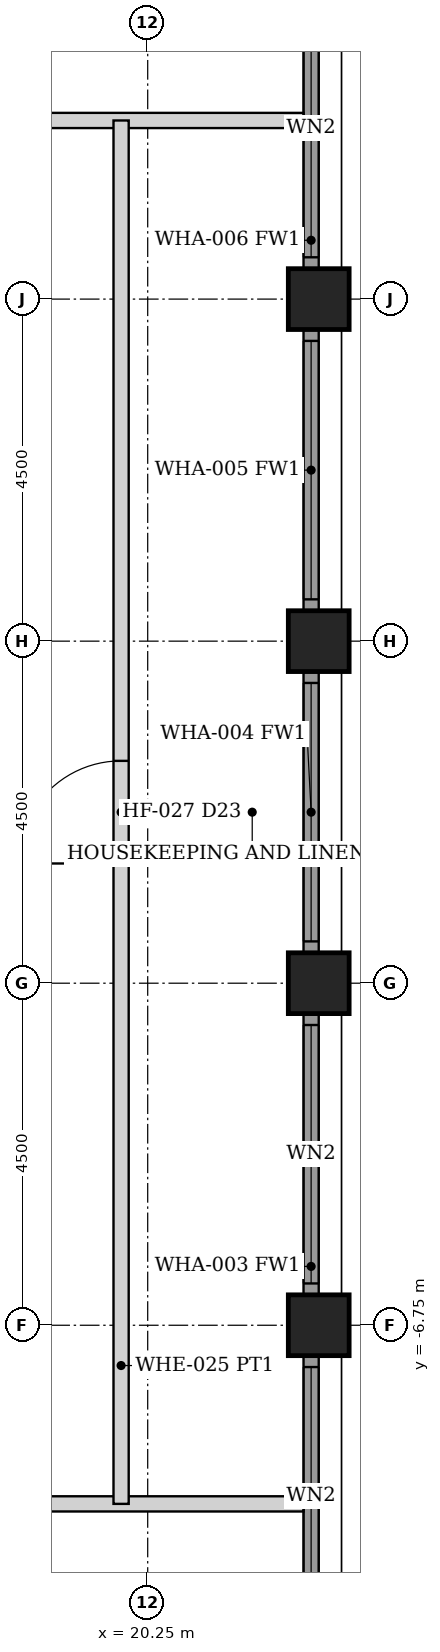
"""IFC4 building model, lengths in metres.
Left out: names, types, materials, properties, quantities, classifications, styles, units other than length and angle.
Written with IfcOpenShell. Run it as: python <this file> out.ifc"""

import sys

from ifc_helpers import new_model, si_unit, direction, frame, frame_2d, origin, origin_2d, place, context, subcontext, project, spatial, rectangle, hollow_rectangle, extrude, element, fill, save


model = new_model("IFC4")
c1 = context("Model", 3, precision=1e-05, world=origin(), true_north=direction((0.0, 1.0)))
c2 = subcontext(c1, "Body", "Model", "MODEL_VIEW")
j1 = project(units=[si_unit("LENGTHUNIT", "METRE"), si_unit("PLANEANGLEUNIT", "RADIAN")], contexts=[c1])
p1 = place(None, origin())
s1 = spatial("IfcSite", under=j1, at=p1, CompositionType="ELEMENT")
p2 = place(p1, origin())
s2 = spatial("IfcBuilding", under=s1, at=p2, CompositionType="ELEMENT")
p3 = place(p2, frame((0.0, 0.0, 172.4)))
s3 = spatial("IfcBuildingStorey", under=s2, at=p3, CompositionType="ELEMENT", Elevation=172.4)
for number, where, z_axis, x_axis in (
    (1, (22.5, -6.75, 0.0), (0.0, 0.0, 1.0), (1.0, 0.0, 0.0)),
    (2, (22.5, -2.25, 0.0), (0.0, 0.0, 1.0), (1.0, 0.0, 0.0)),
    (3, (22.5, 2.25, 0.0), (0.0, 0.0, 1.0), (1.0, 0.0, 0.0)),
    (4, (22.5, 6.75, 0.0), (0.0, 0.0, 1.0), (1.0, 0.0, 0.0)),
):
    element("IfcColumn", number, at=place(p3, frame(where, z_axis=z_axis, x_axis=x_axis)), inside=s3, PredefinedType="COLUMN", context=c2, shape_type="SweptSolid", body=[
        extrude(hollow_rectangle(XDim=0.8, YDim=0.8, WallThickness=0.045, at=origin_2d()), origin(), (0.0, 0.0, 1.0), 3.6),
    ])
p4 = place(p3, frame((22.4, -10.845, 0.0), z_axis=(0.0, 0.0, 1.0), x_axis=(0.0, 1.0, 0.0)))
e5 = element("IfcWall", 5, at=p4, inside=s3, PredefinedType="SOLIDWALL", context=c2, shape_type="SweptSolid", body=[
    extrude(rectangle(XDim=3.69, YDim=0.2, at=frame_2d((1.845, 0.0))), origin(), (0.0, 0.0, 1.0), 2.479),
])
p5 = place(p4, frame((0.145, 0.0, 0.3)))
e6 = element("IfcOpeningElement", 6, at=p5, cuts=e5, PredefinedType="OPENING", context=c2, shape_type="SweptSolid", body=[
    extrude(rectangle(XDim=3.4, YDim=2.029, at=frame_2d((1.7, 1.015))), frame((0.0, 0.11, 0.0), z_axis=(0.0, -1.0, 0.0), x_axis=(1.0, 0.0, 0.0)), (0.0, 0.0, 1.0), 0.22),
])
p6 = place(p3, frame((22.4, -6.345, 0.0), z_axis=(0.0, 0.0, 1.0), x_axis=(0.0, 1.0, 0.0)))
e7 = element("IfcWall", 7, at=p6, inside=s3, PredefinedType="SOLIDWALL", context=c2, shape_type="SweptSolid", body=[
    extrude(rectangle(XDim=3.69, YDim=0.2, at=frame_2d((1.845, 0.0))), origin(), (0.0, 0.0, 1.0), 2.479),
])
p7 = place(p6, frame((0.145, 0.0, 0.3)))
e8 = element("IfcOpeningElement", 8, at=p7, cuts=e7, PredefinedType="OPENING", context=c2, shape_type="SweptSolid", body=[
    extrude(rectangle(XDim=3.4, YDim=2.029, at=frame_2d((1.7, 1.015))), frame((0.0, 0.11, 0.0), z_axis=(0.0, -1.0, 0.0), x_axis=(1.0, 0.0, 0.0)), (0.0, 0.0, 1.0), 0.22),
])
p8 = place(p3, frame((22.4, -1.845, 0.0), z_axis=(0.0, 0.0, 1.0), x_axis=(0.0, 1.0, 0.0)))
e9 = element("IfcWall", 9, at=p8, inside=s3, PredefinedType="SOLIDWALL", context=c2, shape_type="SweptSolid", body=[
    extrude(rectangle(XDim=3.69, YDim=0.2, at=frame_2d((1.845, 0.0))), origin(), (0.0, 0.0, 1.0), 2.479),
])
p9 = place(p8, frame((0.145, 0.0, 0.3)))
e10 = element("IfcOpeningElement", 10, at=p9, cuts=e9, PredefinedType="OPENING", context=c2, shape_type="SweptSolid", body=[
    extrude(rectangle(XDim=3.4, YDim=2.029, at=frame_2d((1.7, 1.015))), frame((0.0, 0.11, 0.0), z_axis=(0.0, -1.0, 0.0), x_axis=(1.0, 0.0, 0.0)), (0.0, 0.0, 1.0), 0.22),
])
p10 = place(p3, frame((22.4, 2.655, 0.0), z_axis=(0.0, 0.0, 1.0), x_axis=(0.0, 1.0, 0.0)))
e11 = element("IfcWall", 11, at=p10, inside=s3, PredefinedType="SOLIDWALL", context=c2, shape_type="SweptSolid", body=[
    extrude(rectangle(XDim=3.69, YDim=0.2, at=frame_2d((1.845, 0.0))), origin(), (0.0, 0.0, 1.0), 2.479),
])
p11 = place(p10, frame((0.145, 0.0, 0.3)))
e12 = element("IfcOpeningElement", 12, at=p11, cuts=e11, PredefinedType="OPENING", context=c2, shape_type="SweptSolid", body=[
    extrude(rectangle(XDim=3.4, YDim=2.029, at=frame_2d((1.7, 1.015))), frame((0.0, 0.11, 0.0), z_axis=(0.0, -1.0, 0.0), x_axis=(1.0, 0.0, 0.0)), (0.0, 0.0, 1.0), 0.22),
])
p12 = place(p3, frame((22.4, 7.155, 0.0), z_axis=(0.0, 0.0, 1.0), x_axis=(0.0, 1.0, 0.0)))
e13 = element("IfcWall", 13, at=p12, inside=s3, PredefinedType="SOLIDWALL", context=c2, shape_type="SweptSolid", body=[
    extrude(rectangle(XDim=3.69, YDim=0.2, at=frame_2d((1.845, 0.0))), origin(), (0.0, 0.0, 1.0), 2.479),
])
p13 = place(p12, frame((0.145, 0.0, 0.3)))
e14 = element("IfcOpeningElement", 14, at=p13, cuts=e13, PredefinedType="OPENING", context=c2, shape_type="SweptSolid", body=[
    extrude(rectangle(XDim=3.4, YDim=2.029, at=frame_2d((1.7, 1.015))), frame((0.0, 0.11, 0.0), z_axis=(0.0, -1.0, 0.0), x_axis=(1.0, 0.0, 0.0)), (0.0, 0.0, 1.0), 0.22),
])
p14 = place(p3, frame((-22.3, 9.1, 0.0), z_axis=(0.0, 0.0, 1.0), x_axis=(1.0, 0.0, 0.0)))
e15 = element("IfcWall", 15, at=p14, inside=s3, PredefinedType="PARTITIONING", context=c2, shape_type="SweptSolid", body=[
    extrude(rectangle(XDim=44.6, YDim=0.2, at=frame_2d((22.3, 0.0))), origin(), (0.0, 0.0, 1.0), 2.473),
])
p15 = place(p14, frame((11.35, 0.0, 0.0)))
e16 = element("IfcOpeningElement", 16, at=p15, cuts=e15, PredefinedType="OPENING", context=c2, shape_type="SweptSolid", body=[
    extrude(rectangle(XDim=0.9, YDim=2.1, at=frame_2d((0.45, 1.05))), frame((0.0, 0.11, 0.0), z_axis=(0.0, -1.0, 0.0), x_axis=(1.0, 0.0, 0.0)), (0.0, 0.0, 1.0), 0.22),
])
p16 = place(p14, frame((18.95, 0.0, 0.0)))
e17 = element("IfcOpeningElement", 17, at=p16, cuts=e15, PredefinedType="OPENING", context=c2, shape_type="SweptSolid", body=[
    extrude(rectangle(XDim=0.9, YDim=2.1, at=frame_2d((0.45, 1.05))), frame((0.0, 0.11, 0.0), z_axis=(0.0, -1.0, 0.0), x_axis=(1.0, 0.0, 0.0)), (0.0, 0.0, 1.0), 0.22),
])
p17 = place(p14, frame((20.25, 0.0, 0.0)))
e18 = element("IfcOpeningElement", 18, at=p17, cuts=e15, PredefinedType="OPENING", context=c2, shape_type="SweptSolid", body=[
    extrude(rectangle(XDim=0.9, YDim=2.1, at=frame_2d((0.45, 1.05))), frame((0.0, 0.11, 0.0), z_axis=(0.0, -1.0, 0.0), x_axis=(1.0, 0.0, 0.0)), (0.0, 0.0, 1.0), 0.22),
])
p18 = place(p14, frame((32.45, 0.0, 0.0)))
e19 = element("IfcOpeningElement", 19, at=p18, cuts=e15, PredefinedType="OPENING", context=c2, shape_type="SweptSolid", body=[
    extrude(rectangle(XDim=0.9, YDim=2.1, at=frame_2d((0.45, 1.05))), frame((0.0, 0.11, 0.0), z_axis=(0.0, -1.0, 0.0), x_axis=(1.0, 0.0, 0.0)), (0.0, 0.0, 1.0), 0.22),
])
p19 = place(p14, frame((36.95, 0.0, 0.0)))
e20 = element("IfcOpeningElement", 20, at=p19, cuts=e15, PredefinedType="OPENING", context=c2, shape_type="SweptSolid", body=[
    extrude(rectangle(XDim=0.9, YDim=2.1, at=frame_2d((0.45, 1.05))), frame((0.0, 0.11, 0.0), z_axis=(0.0, -1.0, 0.0), x_axis=(1.0, 0.0, 0.0)), (0.0, 0.0, 1.0), 0.22),
])
p20 = place(p14, frame((38.85, 0.0, 0.0)))
e21 = element("IfcOpeningElement", 21, at=p20, cuts=e15, PredefinedType="OPENING", context=c2, shape_type="SweptSolid", body=[
    extrude(rectangle(XDim=0.9, YDim=2.1, at=frame_2d((0.45, 1.05))), frame((0.0, 0.11, 0.0), z_axis=(0.0, -1.0, 0.0), x_axis=(1.0, 0.0, 0.0)), (0.0, 0.0, 1.0), 0.22),
])
p21 = place(p14, frame((4.85, 0.0, 0.0)))
e22 = element("IfcOpeningElement", 22, at=p21, cuts=e15, PredefinedType="OPENING", context=c2, shape_type="SweptSolid", body=[
    extrude(rectangle(XDim=0.9, YDim=2.1, at=frame_2d((0.45, 1.05))), frame((0.0, 0.11, 0.0), z_axis=(0.0, -1.0, 0.0), x_axis=(1.0, 0.0, 0.0)), (0.0, 0.0, 1.0), 0.22),
])
p22 = place(p3, frame((-22.3, -9.1, 0.0), z_axis=(0.0, 0.0, 1.0), x_axis=(1.0, 0.0, 0.0)))
e23 = element("IfcWall", 23, at=p22, inside=s3, PredefinedType="PARTITIONING", context=c2, shape_type="SweptSolid", body=[
    extrude(rectangle(XDim=44.6, YDim=0.2, at=frame_2d((22.3, 0.0))), origin(), (0.0, 0.0, 1.0), 2.473),
])
p23 = place(p22, frame((6.75, 0.0, 0.0)))
e24 = element("IfcOpeningElement", 24, at=p23, cuts=e23, PredefinedType="OPENING", context=c2, shape_type="SweptSolid", body=[
    extrude(rectangle(XDim=0.9, YDim=2.1, at=frame_2d((0.45, 1.05))), frame((0.0, 0.11, 0.0), z_axis=(0.0, -1.0, 0.0), x_axis=(1.0, 0.0, 0.0)), (0.0, 0.0, 1.0), 0.22),
])
p24 = place(p22, frame((15.75, 0.0, 0.0)))
e25 = element("IfcOpeningElement", 25, at=p24, cuts=e23, PredefinedType="OPENING", context=c2, shape_type="SweptSolid", body=[
    extrude(rectangle(XDim=0.9, YDim=2.1, at=frame_2d((0.45, 1.05))), frame((0.0, 0.11, 0.0), z_axis=(0.0, -1.0, 0.0), x_axis=(1.0, 0.0, 0.0)), (0.0, 0.0, 1.0), 0.22),
])
p25 = place(p22, frame((32.45, 0.0, 0.0)))
e26 = element("IfcOpeningElement", 26, at=p25, cuts=e23, PredefinedType="OPENING", context=c2, shape_type="SweptSolid", body=[
    extrude(rectangle(XDim=0.9, YDim=2.1, at=frame_2d((0.45, 1.05))), frame((0.0, 0.11, 0.0), z_axis=(0.0, -1.0, 0.0), x_axis=(1.0, 0.0, 0.0)), (0.0, 0.0, 1.0), 0.22),
])
p26 = place(p22, frame((33.75, 0.0, 0.0)))
e27 = element("IfcOpeningElement", 27, at=p26, cuts=e23, PredefinedType="OPENING", context=c2, shape_type="SweptSolid", body=[
    extrude(rectangle(XDim=0.9, YDim=2.1, at=frame_2d((0.45, 1.05))), frame((0.0, 0.11, 0.0), z_axis=(0.0, -1.0, 0.0), x_axis=(1.0, 0.0, 0.0)), (0.0, 0.0, 1.0), 0.22),
])
p27 = place(p22, frame((38.85, 0.0, 0.0)))
e28 = element("IfcOpeningElement", 28, at=p27, cuts=e23, PredefinedType="OPENING", context=c2, shape_type="SweptSolid", body=[
    extrude(rectangle(XDim=0.9, YDim=2.1, at=frame_2d((0.45, 1.05))), frame((0.0, 0.11, 0.0), z_axis=(0.0, -1.0, 0.0), x_axis=(1.0, 0.0, 0.0)), (0.0, 0.0, 1.0), 0.22),
])
p28 = place(p22, frame((4.85, 0.0, 0.0)))
e29 = element("IfcOpeningElement", 29, at=p28, cuts=e23, PredefinedType="OPENING", context=c2, shape_type="SweptSolid", body=[
    extrude(rectangle(XDim=0.9, YDim=2.1, at=frame_2d((0.45, 1.05))), frame((0.0, 0.11, 0.0), z_axis=(0.0, -1.0, 0.0), x_axis=(1.0, 0.0, 0.0)), (0.0, 0.0, 1.0), 0.22),
])
p29 = place(p3, frame((19.9, -9.1, 0.0), z_axis=(0.0, 0.0, 1.0), x_axis=(0.0, 1.0, 0.0)))
e30 = element("IfcWall", 30, at=p29, inside=s3, PredefinedType="PARTITIONING", context=c2, shape_type="SweptSolid", body=[
    extrude(rectangle(XDim=18.2, YDim=0.2, at=frame_2d((9.1, 0.0))), origin(), (0.0, 0.0, 1.0), 2.473),
])
p30 = place(p29, frame((8.425, 0.0, 0.0)))
e31 = element("IfcOpeningElement", 31, at=p30, cuts=e30, PredefinedType="OPENING", context=c2, shape_type="SweptSolid", body=[
    extrude(rectangle(XDim=1.35, YDim=2.1, at=frame_2d((0.675, 1.05))), frame((0.0, 0.11, 0.0), z_axis=(0.0, -1.0, 0.0), x_axis=(1.0, 0.0, 0.0)), (0.0, 0.0, 1.0), 0.22),
])
p31 = place(p5, origin())
e32 = element("IfcWindow", 32, at=p31, inside=s3, PartitioningType="SINGLE_PANEL", PredefinedType="WINDOW", context=c2, shape_type="SweptSolid", body=[
    extrude(rectangle(XDim=3.4, YDim=2.029, at=frame_2d((1.7, 1.015))), frame((0.0, 0.03, 0.0), z_axis=(0.0, -1.0, 0.0), x_axis=(1.0, 0.0, 0.0)), (0.0, 0.0, 1.0), 0.06),
])
fill(e6, e32)
p32 = place(p7, origin())
e33 = element("IfcWindow", 33, at=p32, inside=s3, PartitioningType="SINGLE_PANEL", PredefinedType="WINDOW", context=c2, shape_type="SweptSolid", body=[
    extrude(rectangle(XDim=3.4, YDim=2.029, at=frame_2d((1.7, 1.015))), frame((0.0, 0.03, 0.0), z_axis=(0.0, -1.0, 0.0), x_axis=(1.0, 0.0, 0.0)), (0.0, 0.0, 1.0), 0.06),
])
fill(e8, e33)
p33 = place(p9, origin())
e34 = element("IfcWindow", 34, at=p33, inside=s3, PartitioningType="SINGLE_PANEL", PredefinedType="WINDOW", context=c2, shape_type="SweptSolid", body=[
    extrude(rectangle(XDim=3.4, YDim=2.029, at=frame_2d((1.7, 1.015))), frame((0.0, 0.03, 0.0), z_axis=(0.0, -1.0, 0.0), x_axis=(1.0, 0.0, 0.0)), (0.0, 0.0, 1.0), 0.06),
])
fill(e10, e34)
p34 = place(p11, origin())
e35 = element("IfcWindow", 35, at=p34, inside=s3, PartitioningType="SINGLE_PANEL", PredefinedType="WINDOW", context=c2, shape_type="SweptSolid", body=[
    extrude(rectangle(XDim=3.4, YDim=2.029, at=frame_2d((1.7, 1.015))), frame((0.0, 0.03, 0.0), z_axis=(0.0, -1.0, 0.0), x_axis=(1.0, 0.0, 0.0)), (0.0, 0.0, 1.0), 0.06),
])
fill(e12, e35)
p35 = place(p13, origin())
e36 = element("IfcWindow", 36, at=p35, inside=s3, PartitioningType="SINGLE_PANEL", PredefinedType="WINDOW", context=c2, shape_type="SweptSolid", body=[
    extrude(rectangle(XDim=3.4, YDim=2.029, at=frame_2d((1.7, 1.015))), frame((0.0, 0.03, 0.0), z_axis=(0.0, -1.0, 0.0), x_axis=(1.0, 0.0, 0.0)), (0.0, 0.0, 1.0), 0.06),
])
fill(e14, e36)
p36 = place(p30, origin())
e37 = element("IfcDoor", 37, at=p36, inside=s3, OperationType="SINGLE_SWING_LEFT", PredefinedType="DOOR", context=c2, shape_type="SweptSolid", body=[
    extrude(rectangle(XDim=1.35, YDim=2.1, at=frame_2d((0.675, 1.05))), frame((0.0, 0.025, 0.0), z_axis=(0.0, -1.0, 0.0), x_axis=(1.0, 0.0, 0.0)), (0.0, 0.0, 1.0), 0.05),
])
fill(e31, e37)
save(model, sys.argv[1])
